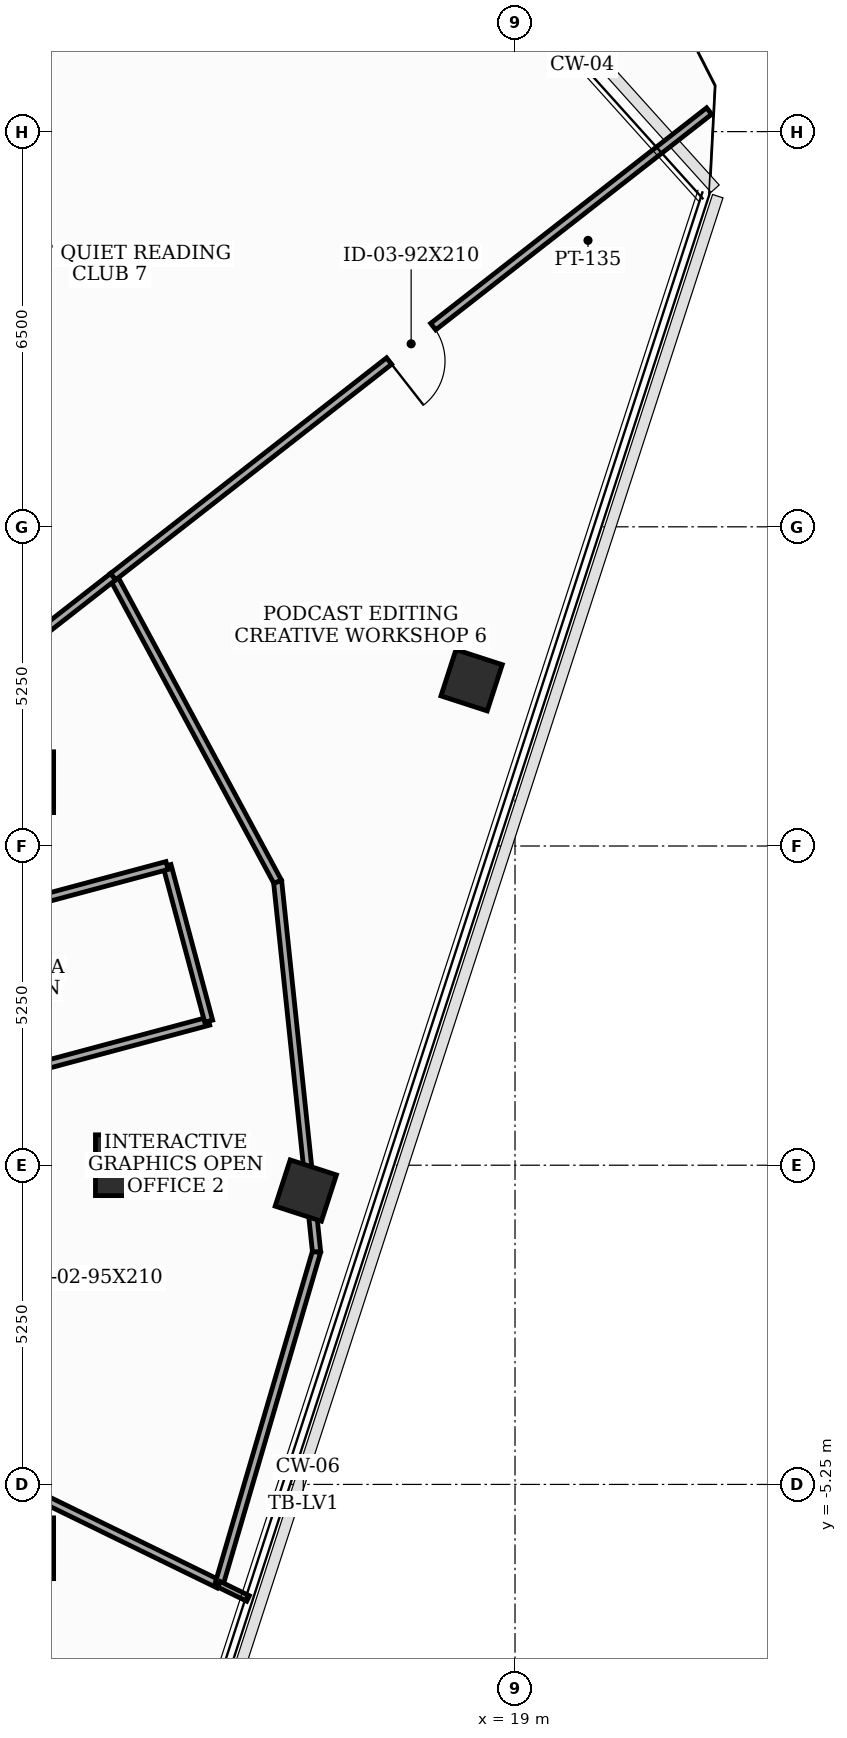
"""IFC4 building model, lengths in metres.
Left out: names, types, materials, properties, quantities, classifications, styles, units other than length and angle.
Written with IfcOpenShell. Run it as: python <this file> out.ifc"""

import sys

from ifc_helpers import new_model, si_unit, direction, frame, frame_2d, origin, origin_2d, place, context, subcontext, project, spatial, rectangle, extrude, element, fill, save


model = new_model("IFC4")
c1 = context("Model", 3, precision=1e-05, world=origin(), true_north=direction((0.0, 1.0)))
c2 = subcontext(c1, "Body", "Model", "MODEL_VIEW")
j1 = project(units=[si_unit("LENGTHUNIT", "METRE"), si_unit("PLANEANGLEUNIT", "RADIAN")], contexts=[c1])
p1 = place(None, origin())
s1 = spatial("IfcSite", under=j1, at=p1, CompositionType="ELEMENT")
p2 = place(p1, origin())
s2 = spatial("IfcBuilding", under=s1, at=p2, CompositionType="ELEMENT")
p3 = place(p2, frame((0.0, 0.0, 298.0)))
s3 = spatial("IfcBuildingStorey", under=s2, at=p3, CompositionType="ELEMENT", Elevation=298.0)
for number, where, z_axis, x_axis in (
    (1, (12.6, 0.0, 0.0), (0.0, 0.0, 1.0), (1.0, 0.0, 0.0)),
    (2, (10.912, 6.3, 0.0), (0.0, 0.0, 1.0), (1.0, 0.0, 0.0)),
    (3, (10.912, -6.3, 0.0), (0.0, 0.0, 1.0), (1.0, 0.0, 0.0)),
):
    element("IfcColumn", number, at=place(p3, frame(where, z_axis=z_axis, x_axis=x_axis)), inside=s3, PredefinedType="COLUMN", context=c2, shape_type="SweptSolid", body=[
        extrude(rectangle(XDim=1.0, YDim=1.0, at=origin_2d()), origin(), (0.0, 0.0, 1.0), 3.7),
    ])
for number, where, z_axis, x_axis in (
    (4, (15.559, -0.417, 0.0), (0.0, 0.0, 1.0), (0.309, 0.951, 0.0)),
    (5, (18.286, 7.976, 0.0), (0.0, 0.0, 1.0), (0.309, 0.951, 0.0)),
):
    element("IfcColumn", number, at=place(p3, frame(where, z_axis=z_axis, x_axis=x_axis)), inside=s3, PredefinedType="COLUMN", context=c2, shape_type="SweptSolid", body=[
        extrude(rectangle(XDim=0.8, YDim=0.8, at=origin_2d()), origin(), (0.0, 0.0, 1.0), 3.7),
    ])
p4 = place(p3, frame((10.65, 1.482, 0.0), z_axis=(0.0, 0.0, 1.0), x_axis=(0.965961397105, 0.2586862565, 0.0)))
e6 = element("IfcWall", 6, at=p4, inside=s3, PredefinedType="PARTITIONING", context=c2, shape_type="SweptSolid", body=[
    extrude(rectangle(XDim=3.429, YDim=0.135, at=frame_2d((1.714, 0.0))), origin(), (0.0, 0.0, 1.0), 2.885),
])
p5 = place(p3, frame((13.962, 2.369, 0.0), z_axis=(0.0, 0.0, 1.0), x_axis=(-0.258413725385, 0.966034340245, 0.0)))
e7 = element("IfcWall", 7, at=p5, inside=s3, PredefinedType="PARTITIONING", context=c2, shape_type="SweptSolid", body=[
    extrude(rectangle(XDim=2.65, YDim=0.135, at=frame_2d((1.325, 0.0))), origin(), (0.0, 0.0, 1.0), 3.5),
])
p6 = place(p3, frame((13.277, 4.929, 0.0), z_axis=(0.0, 0.0, 1.0), x_axis=(-0.965934830229, -0.258785439601, 0.0)))
e8 = element("IfcWall", 8, at=p6, inside=s3, PredefinedType="PARTITIONING", context=c2, shape_type="SweptSolid", body=[
    extrude(rectangle(XDim=2.72, YDim=0.135, at=frame_2d((1.36, 0.0))), origin(), (0.0, 0.0, 1.0), 2.885),
])
p7 = place(p3, frame((10.65, -5.194, 0.0), z_axis=(0.0, 0.0, 1.0), x_axis=(0.898781159743, -0.438397567159, 0.0)))
e9 = element("IfcWall", 9, at=p7, inside=s3, PredefinedType="PARTITIONING", context=c2, shape_type="SweptSolid", body=[
    extrude(rectangle(XDim=3.875, YDim=0.135, at=frame_2d((1.938, 0.0))), origin(), (0.0, 0.0, 1.0), 2.885),
])
p8 = place(p3, frame((14.133, -6.893, 0.0), z_axis=(0.0, 0.0, 1.0), x_axis=(0.281231672123, 0.959639904649, 0.0)))
e10 = element("IfcWall", 10, at=p8, inside=s3, PredefinedType="PARTITIONING", context=c2, shape_type="SweptSolid", body=[
    extrude(rectangle(XDim=5.7, YDim=0.135, at=frame_2d((2.85, 0.0))), origin(), (0.0, 0.0, 1.0), 3.5),
])
p9 = place(p3, frame((15.736, -1.423, 0.0), z_axis=(0.0, 0.0, 1.0), x_axis=(-0.104601717472, 0.994514193313, 0.0)))
e11 = element("IfcWall", 11, at=p9, inside=s3, PredefinedType="PARTITIONING", context=c2, shape_type="SweptSolid", body=[
    extrude(rectangle(XDim=6.12, YDim=0.135, at=frame_2d((3.06, 0.0))), origin(), (0.0, 0.0, 1.0), 3.035),
])
p10 = place(p3, frame((15.096, 4.663, 0.0), z_axis=(0.0, 0.0, 1.0), x_axis=(-0.474498198469, 0.88025647379, 0.0)))
e12 = element("IfcWall", 12, at=p10, inside=s3, PredefinedType="PARTITIONING", context=c2, shape_type="SweptSolid", body=[
    extrude(rectangle(XDim=5.7, YDim=0.135, at=frame_2d((2.85, 0.0))), origin(), (0.0, 0.0, 1.0), 3.035),
])
p11 = place(p3, frame((12.391, 9.681, 0.0), z_axis=(0.0, 0.0, 1.0), x_axis=(-0.788124883644, -0.615515367624, 0.0)))
e13 = element("IfcWall", 13, at=p11, inside=s3, PredefinedType="PARTITIONING", context=c2, shape_type="SweptSolid", body=[
    extrude(rectangle(XDim=2.209, YDim=0.135, at=frame_2d((1.104, 0.0))), origin(), (0.0, 0.0, 1.0), 3.5),
])
p12 = place(p3, frame((14.609, -7.126, 0.0), z_axis=(0.0, 0.0, 1.0), x_axis=(-0.898533726223, 0.438904480313, 0.0)))
e14 = element("IfcWall", 14, at=p12, inside=s3, PredefinedType="MOVABLE", context=c2, shape_type="SweptSolid", body=[
    extrude(rectangle(XDim=0.53, YDim=0.1, at=frame_2d((0.265, 0.0))), origin(), (0.0, 0.0, 1.0), 3.5),
])
p13 = place(p3, frame((22.192, 17.338, 0.0), z_axis=(0.0, 0.0, 1.0), x_axis=(-0.788015446076, -0.615655469192, 0.0)))
e15 = element("IfcWall", 15, at=p13, inside=s3, PredefinedType="PARTITIONING", context=c2, shape_type="SweptSolid", body=[
    extrude(rectangle(XDim=12.438, YDim=0.135, at=frame_2d((6.219, 0.0))), origin(), (0.0, 0.0, 1.0), 3.035),
])
p14 = place(p13, frame((5.759, 0.0, 0.0)))
e16 = element("IfcOpeningElement", 16, at=p14, cuts=e15, PredefinedType="OPENING", context=c2, shape_type="SweptSolid", body=[
    extrude(rectangle(XDim=0.92, YDim=2.1, at=frame_2d((0.46, 1.05))), frame((0.0, 0.077, 0.0), z_axis=(0.0, -1.0, 0.0), x_axis=(1.0, 0.0, 0.0)), (0.0, 0.0, 1.0), 0.155),
])
p15 = place(p14, origin())
e17 = element("IfcDoor", 17, at=p15, inside=s3, OperationType="SINGLE_SWING_RIGHT", PredefinedType="DOOR", context=c2, shape_type="SweptSolid", body=[
    extrude(rectangle(XDim=0.92, YDim=2.1, at=frame_2d((0.46, 1.05))), frame((0.0, 0.025, 0.0), z_axis=(0.0, -1.0, 0.0), x_axis=(1.0, 0.0, 0.0)), (0.0, 0.0, 1.0), 0.05),
])
fill(e16, e17)
save(model, sys.argv[1])
